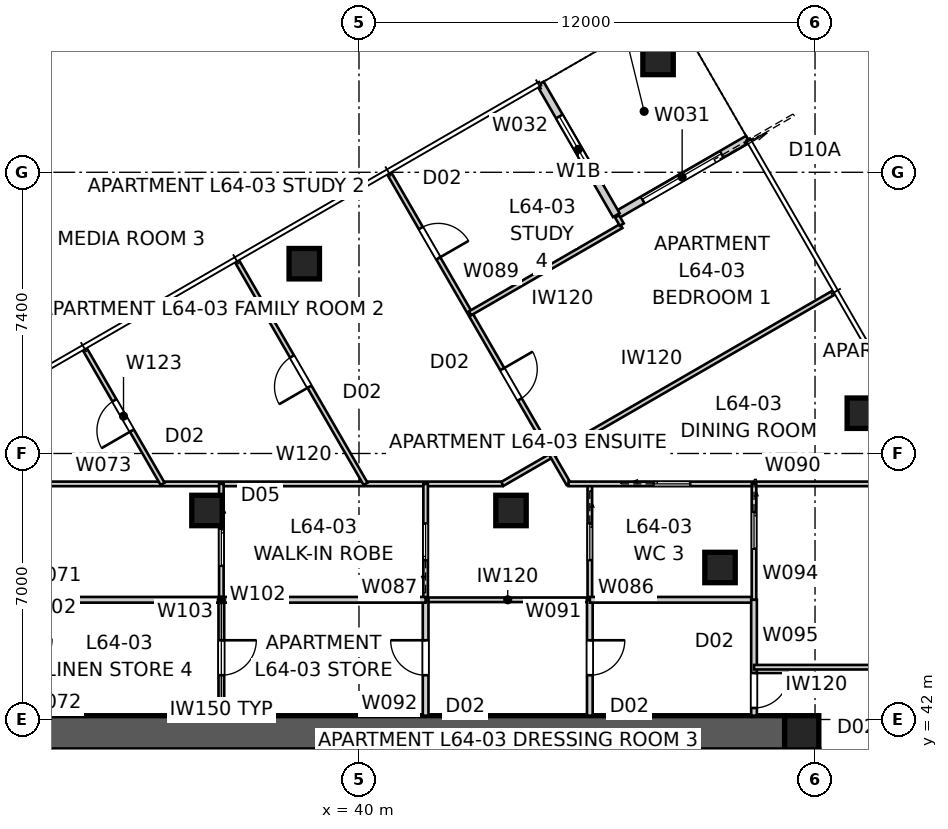
"""IFC4 building model, lengths in metres.
Left out: names, types, materials, properties, quantities, classifications, styles, units other than length and angle.
Written with IfcOpenShell. Run it as: python <this file> out.ifc"""

import sys

from ifc_helpers import new_model, si_unit, direction, frame, frame_2d, origin, origin_2d, place, context, subcontext, project, spatial, polyline, rectangle, outline, extrude, element, fill, save


model = new_model("IFC4")
c1 = context("Model", 3, precision=1e-05, world=origin(), true_north=direction((0.0, 1.0)))
c2 = subcontext(c1, "Body", "Model", "MODEL_VIEW")
j1 = project(units=[si_unit("LENGTHUNIT", "METRE"), si_unit("PLANEANGLEUNIT", "RADIAN")], contexts=[c1])
p1 = place(None, origin())
s1 = spatial("IfcSite", under=j1, at=p1, CompositionType="ELEMENT")
p2 = place(p1, origin())
s2 = spatial("IfcBuilding", under=s1, at=p2, CompositionType="ELEMENT")
p3 = place(p2, frame((0.0, 0.0, 232.0)))
s3 = spatial("IfcBuildingStorey", under=s2, at=p3, CompositionType="ELEMENT", Elevation=232.0)
p4 = place(p3, frame((28.8, 41.65, 0.0), z_axis=(0.0, 0.0, 1.0), x_axis=(1.0, 0.0, 0.0)))
e1 = element("IfcWall", 1, at=p4, inside=s3, PredefinedType="SHEAR", context=c2, shape_type="SweptSolid", body=[
    extrude(outline(polyline([(0.0, -0.45), (22.4, -0.45), (22.4, -0.025), (22.85, -0.025), (22.85, 0.025), (22.4, 0.025), (22.4, 0.45), (0.0, 0.45), (0.0, 0.025), (-0.45, 0.025), (-0.45, -0.025), (0.0, -0.025), (0.0, -0.45)])), origin(), (0.0, 0.0, 1.0), 3.4),
])
p5 = place(p3, frame((51.65, 18.8, 0.0), z_axis=(0.0, 0.0, 1.0), x_axis=(0.0, 1.0, 0.0)))
e2 = element("IfcWall", 2, at=p5, inside=s3, PredefinedType="SHEAR", context=c2, shape_type="SweptSolid", body=[
    extrude(outline(polyline([(0.0, -0.45), (22.4, -0.45), (22.4, -0.025), (22.85, -0.025), (22.85, 0.025), (22.4, 0.025), (22.4, 0.45), (0.0, 0.45), (0.0, 0.025), (-0.45, 0.025), (-0.45, -0.025), (0.0, -0.025), (0.0, -0.45)])), origin(), (0.0, 0.0, 1.0), 3.4),
])
p6 = place(p5, frame((11.14, 0.0, 0.0)))
e3 = element("IfcOpeningElement", 3, at=p6, cuts=e2, PredefinedType="OPENING", context=c2, shape_type="SweptSolid", body=[
    extrude(rectangle(XDim=1.02, YDim=2.4, at=frame_2d((0.51, 1.2))), frame((0.0, 0.46, 0.0), z_axis=(0.0, -1.0, 0.0), x_axis=(1.0, 0.0, 0.0)), (0.0, 0.0, 1.0), 0.92),
])
p7 = place(p3, frame((51.65, 41.65, 0.0), z_axis=(0.0, 0.0, 1.0), x_axis=(1.0, 0.0, 0.0)))
e4 = element("IfcColumn", 4, at=p7, inside=s3, PredefinedType="COLUMN", context=c2, shape_type="SweptSolid", body=[
    extrude(rectangle(XDim=0.9, YDim=0.9, at=origin_2d()), origin(), (0.0, 0.0, 1.0), 3.4),
])
for number, where, z_axis, x_axis in (
    (5, (53.245, 50.06, 0.0), (0.0, 0.0, 1.0), (1.0, 0.0, 0.0)),
    (6, (47.87, 59.37, 0.0), (0.0, 0.0, 1.0), (1.0, 0.0, 0.0)),
    (7, (38.56, 53.995, 0.0), (0.0, 0.0, 1.0), (1.0, 0.0, 0.0)),
):
    element("IfcColumn", number, at=place(p3, frame(where, z_axis=z_axis, x_axis=x_axis)), inside=s3, PredefinedType="COLUMN", context=c2, shape_type="SweptSolid", body=[
        extrude(rectangle(XDim=0.8, YDim=0.8, at=origin_2d()), origin(), (0.0, 0.0, 1.0), 3.2),
    ])
for number, where, z_axis, x_axis in (
    (8, (49.5, 46.0, 0.0), (0.0, 0.0, 1.0), (1.0, 0.0, 0.0)),
    (9, (44.0, 47.5, 0.0), (0.0, 0.0, 1.0), (1.0, 0.0, 0.0)),
    (10, (36.0, 47.5, 0.0), (0.0, 0.0, 1.0), (1.0, 0.0, 0.0)),
):
    element("IfcColumn", number, at=place(p3, frame(where, z_axis=z_axis, x_axis=x_axis)), inside=s3, PredefinedType="COLUMN", context=c2, shape_type="SweptSolid", body=[
        extrude(rectangle(XDim=0.8, YDim=0.8, at=origin_2d()), origin(), (0.0, 0.0, 1.0), 3.4),
    ])
p8 = place(p3, frame((50.236, 57.271, 0.0), z_axis=(0.0, 0.0, 1.0), x_axis=(-0.866026010844, -0.49999894854, 0.0)))
e11 = element("IfcWall", 11, at=p8, inside=s3, PredefinedType="SOLIDWALL", context=c2, shape_type="SweptSolid", body=[
    extrude(rectangle(XDim=4.0, YDim=0.2, at=frame_2d((2.0, 0.0))), origin(), (0.0, 0.0, 1.0), 3.2),
])
p9 = place(p8, frame((0.8, 0.0, 0.0)))
e12 = element("IfcOpeningElement", 12, at=p9, cuts=e11, PredefinedType="OPENING", context=c2, shape_type="SweptSolid", body=[
    extrude(rectangle(XDim=2.4, YDim=2.1, at=frame_2d((1.2, 1.05))), frame((0.0, 0.11, 0.0), z_axis=(0.0, -1.0, 0.0), x_axis=(1.0, 0.0, 0.0)), (0.0, 0.0, 1.0), 0.22),
])
p10 = place(p3, frame((46.771, 55.271, 0.0), z_axis=(0.0, 0.0, 1.0), x_axis=(-0.49999894854, 0.866026010844, 0.0)))
e13 = element("IfcWall", 13, at=p10, inside=s3, PredefinedType="SOLIDWALL", context=c2, shape_type="SweptSolid", body=[
    extrude(rectangle(XDim=4.0, YDim=0.2, at=frame_2d((2.0, 0.0))), origin(), (0.0, 0.0, 1.0), 3.2),
])
p11 = place(p10, frame((1.0, 0.0, 0.4)))
e14 = element("IfcOpeningElement", 14, at=p11, cuts=e13, PredefinedType="OPENING", context=c2, shape_type="SweptSolid", body=[
    extrude(rectangle(XDim=2.0, YDim=1.8, at=frame_2d((1.0, 0.9))), frame((0.0, 0.11, 0.0), z_axis=(0.0, -1.0, 0.0), x_axis=(1.0, 0.0, 0.0)), (0.0, 0.0, 1.0), 0.22),
])
p12 = place(p3, frame((59.486, 41.25, 0.0), z_axis=(0.0, 0.0, 1.0), x_axis=(-0.866020489494, -0.500008511703, 0.0)))
e15 = element("IfcWall", 15, at=p12, inside=s3, PredefinedType="PARTITIONING", context=c2, shape_type="SweptSolid", body=[
    extrude(rectangle(XDim=8.496, YDim=0.25, at=frame_2d((4.248, 0.0))), origin(), (0.0, 0.0, 1.0), 3.2),
])
p13 = place(p3, frame((26.603, 48.2, 0.0), z_axis=(0.0, 0.0, 1.0), x_axis=(1.0, 0.0, 0.0)))
e16 = element("IfcWall", 16, at=p13, inside=s3, PredefinedType="PARTITIONING", context=c2, shape_type="SweptSolid", body=[
    extrude(rectangle(XDim=17.17, YDim=0.12, at=frame_2d((8.585, 0.0))), origin(), (0.0, 0.0, 1.0), 3.2),
])
p14 = place(p13, frame((1.25, 0.0, 0.0)))
e17 = element("IfcOpeningElement", 17, at=p14, cuts=e16, PredefinedType="OPENING", context=c2, shape_type="SweptSolid", body=[
    extrude(rectangle(XDim=0.92, YDim=2.1, at=frame_2d((0.46, 1.05))), frame((0.0, 0.07, 0.0), z_axis=(0.0, -1.0, 0.0), x_axis=(1.0, 0.0, 0.0)), (0.0, 0.0, 1.0), 0.14),
])
p15 = place(p3, frame((46.074, 45.15, 0.0), z_axis=(0.0, 0.0, 1.0), x_axis=(-1.0, 0.0, 0.0)))
e18 = element("IfcWall", 18, at=p15, inside=s3, PredefinedType="PARTITIONING", context=c2, shape_type="SweptSolid", body=[
    extrude(rectangle(XDim=4.321, YDim=0.12, at=frame_2d((2.16, 0.0))), origin(), (0.0, 0.0, 1.0), 3.2),
])
p16 = place(p3, frame((46.074, 48.2, 0.0), z_axis=(0.0, 0.0, 1.0), x_axis=(0.0, -1.0, 0.0)))
e19 = element("IfcWall", 19, at=p16, inside=s3, PredefinedType="PARTITIONING", context=c2, shape_type="SweptSolid", body=[
    extrude(rectangle(XDim=3.05, YDim=0.12, at=frame_2d((1.525, 0.0))), origin(), (0.0, 0.0, 1.0), 3.2),
])
p17 = place(p16, frame((1.045, 0.0, 0.0)))
e20 = element("IfcOpeningElement", 20, at=p17, cuts=e19, PredefinedType="OPENING", context=c2, shape_type="SweptSolid", body=[
    extrude(rectangle(XDim=0.96, YDim=2.1, at=frame_2d((0.48, 1.05))), frame((0.0, 0.07, 0.0), z_axis=(0.0, -1.0, 0.0), x_axis=(1.0, 0.0, 0.0)), (0.0, 0.0, 1.0), 0.14),
])
p18 = place(p3, frame((41.753, 45.15, 0.0), z_axis=(0.0, 0.0, 1.0), x_axis=(0.0, 1.0, 0.0)))
e21 = element("IfcWall", 21, at=p18, inside=s3, PredefinedType="PARTITIONING", context=c2, shape_type="SweptSolid", body=[
    extrude(rectangle(XDim=3.05, YDim=0.12, at=frame_2d((1.525, 0.0))), origin(), (0.0, 0.0, 1.0), 3.2),
])
p19 = place(p18, frame((1.045, 0.0, 0.0)))
e22 = element("IfcOpeningElement", 22, at=p19, cuts=e21, PredefinedType="OPENING", context=c2, shape_type="SweptSolid", body=[
    extrude(rectangle(XDim=0.96, YDim=2.1, at=frame_2d((0.48, 1.05))), frame((0.0, 0.07, 0.0), z_axis=(0.0, -1.0, 0.0), x_axis=(1.0, 0.0, 0.0)), (0.0, 0.0, 1.0), 0.14),
])
p20 = place(p3, frame((43.773, 48.2, 0.0), z_axis=(0.0, 0.0, 1.0), x_axis=(0.866020818659, 0.500007941587, 0.0)))
e23 = element("IfcWall", 23, at=p20, inside=s3, PredefinedType="PARTITIONING", context=c2, shape_type="SweptSolid", body=[
    extrude(rectangle(XDim=10.092, YDim=0.12, at=frame_2d((5.046, 0.0))), origin(), (0.0, 0.0, 1.0), 3.2),
])
p21 = place(p3, frame((40.786, 56.388, 0.0), z_axis=(0.0, 0.0, 1.0), x_axis=(0.49999364752, -0.86602907136, 0.0)))
e24 = element("IfcWall", 24, at=p21, inside=s3, PredefinedType="PARTITIONING", context=c2, shape_type="SweptSolid", body=[
    extrude(rectangle(XDim=9.455, YDim=0.12, at=frame_2d((4.728, 0.0))), origin(), (0.0, 0.0, 1.0), 3.2),
])
p22 = place(p21, frame((1.681, 0.0, 0.0)))
e25 = element("IfcOpeningElement", 25, at=p22, cuts=e24, PredefinedType="OPENING", context=c2, shape_type="SweptSolid", body=[
    extrude(rectangle(XDim=0.92, YDim=2.34, at=frame_2d((0.46, 1.17))), frame((0.0, 0.07, 0.0), z_axis=(0.0, -1.0, 0.0), x_axis=(1.0, 0.0, 0.0)), (0.0, 0.0, 1.0), 0.14),
])
p23 = place(p21, frame((5.969, 0.0, 0.0)))
e26 = element("IfcOpeningElement", 26, at=p23, cuts=e24, PredefinedType="OPENING", context=c2, shape_type="SweptSolid", body=[
    extrude(rectangle(XDim=0.92, YDim=2.34, at=frame_2d((0.46, 1.17))), frame((0.0, 0.07, 0.0), z_axis=(0.0, -1.0, 0.0), x_axis=(1.0, 0.0, 0.0)), (0.0, 0.0, 1.0), 0.14),
])
p24 = place(p3, frame((45.514, 48.2, 0.0), z_axis=(0.0, 0.0, 1.0), x_axis=(1.0, 0.0, 0.0)))
e27 = element("IfcWall", 27, at=p24, inside=s3, PredefinedType="PARTITIONING", context=c2, shape_type="SweptSolid", body=[
    extrude(rectangle(XDim=9.913, YDim=0.12, at=frame_2d((4.957, 0.0))), origin(), (0.0, 0.0, 1.0), 3.2),
])
p25 = place(p24, frame((2.241, 0.0, 0.0)))
e28 = element("IfcOpeningElement", 28, at=p25, cuts=e27, PredefinedType="OPENING", context=c2, shape_type="SweptSolid", body=[
    extrude(rectangle(XDim=0.96, YDim=2.1, at=frame_2d((0.48, 1.05))), frame((0.0, 0.07, 0.0), z_axis=(0.0, -1.0, 0.0), x_axis=(1.0, 0.0, 0.0)), (0.0, 0.0, 1.0), 0.14),
])
p26 = place(p24, frame((8.603, 0.0, 0.0)))
e29 = element("IfcOpeningElement", 29, at=p26, cuts=e27, PredefinedType="OPENING", context=c2, shape_type="SweptSolid", body=[
    extrude(rectangle(XDim=0.92, YDim=2.1, at=frame_2d((0.46, 1.05))), frame((0.0, 0.07, 0.0), z_axis=(0.0, -1.0, 0.0), x_axis=(1.0, 0.0, 0.0)), (0.0, 0.0, 1.0), 0.14),
])
p27 = place(p3, frame((46.074, 45.15, 0.0), z_axis=(0.0, 0.0, 1.0), x_axis=(0.0, -1.0, 0.0)))
e30 = element("IfcWall", 30, at=p27, inside=s3, PredefinedType="SOLIDWALL", context=c2, shape_type="SweptSolid", body=[
    extrude(rectangle(XDim=3.05, YDim=0.15, at=frame_2d((1.525, 0.0))), origin(), (0.0, 0.0, 1.0), 3.2),
])
p28 = place(p27, frame((1.065, 0.0, 0.0)))
e31 = element("IfcOpeningElement", 31, at=p28, cuts=e30, PredefinedType="OPENING", context=c2, shape_type="SweptSolid", body=[
    extrude(rectangle(XDim=0.92, YDim=2.34, at=frame_2d((0.46, 1.17))), frame((0.0, 0.085, 0.0), z_axis=(0.0, -1.0, 0.0), x_axis=(1.0, 0.0, 0.0)), (0.0, 0.0, 1.0), 0.17),
])
p29 = place(p3, frame((41.753, 42.1, 0.0), z_axis=(0.0, 0.0, 1.0), x_axis=(0.0, 1.0, 0.0)))
e32 = element("IfcWall", 32, at=p29, inside=s3, PredefinedType="SOLIDWALL", context=c2, shape_type="SweptSolid", body=[
    extrude(rectangle(XDim=3.05, YDim=0.15, at=frame_2d((1.525, 0.0))), origin(), (0.0, 0.0, 1.0), 3.2),
])
p30 = place(p29, frame((1.065, 0.0, 0.0)))
e33 = element("IfcOpeningElement", 33, at=p30, cuts=e32, PredefinedType="OPENING", context=c2, shape_type="SweptSolid", body=[
    extrude(rectangle(XDim=0.92, YDim=2.34, at=frame_2d((0.46, 1.17))), frame((0.0, 0.085, 0.0), z_axis=(0.0, -1.0, 0.0), x_axis=(1.0, 0.0, 0.0)), (0.0, 0.0, 1.0), 0.17),
])
p31 = place(p3, frame((50.395, 45.15, 0.0), z_axis=(0.0, 0.0, 1.0), x_axis=(-1.0, 0.0, 0.0)))
e34 = element("IfcWall", 34, at=p31, inside=s3, PredefinedType="SOLIDWALL", context=c2, shape_type="SweptSolid", body=[
    extrude(rectangle(XDim=4.321, YDim=0.15, at=frame_2d((2.16, 0.0))), origin(), (0.0, 0.0, 1.0), 3.2),
])
p32 = place(p3, frame((50.395, 48.2, 0.0), z_axis=(0.0, 0.0, 1.0), x_axis=(0.0, -1.0, 0.0)))
e35 = element("IfcWall", 35, at=p32, inside=s3, PredefinedType="PARTITIONING", context=c2, shape_type="SweptSolid", body=[
    extrude(rectangle(XDim=3.05, YDim=0.12, at=frame_2d((1.525, 0.0))), origin(), (0.0, 0.0, 1.0), 3.2),
])
p33 = place(p32, frame((0.745, 0.0, 0.0)))
e36 = element("IfcOpeningElement", 36, at=p33, cuts=e35, PredefinedType="OPENING", context=c2, shape_type="SweptSolid", body=[
    extrude(rectangle(XDim=0.96, YDim=2.1, at=frame_2d((0.48, 1.05))), frame((0.0, 0.07, 0.0), z_axis=(0.0, -1.0, 0.0), x_axis=(1.0, 0.0, 0.0)), (0.0, 0.0, 1.0), 0.14),
])
p34 = place(p3, frame((50.395, 45.15, 0.0), z_axis=(0.0, 0.0, 1.0), x_axis=(0.0, -1.0, 0.0)))
e37 = element("IfcWall", 37, at=p34, inside=s3, PredefinedType="SOLIDWALL", context=c2, shape_type="SweptSolid", body=[
    extrude(rectangle(XDim=3.05, YDim=0.15, at=frame_2d((1.525, 0.0))), origin(), (0.0, 0.0, 1.0), 3.2),
])
p35 = place(p34, frame((1.927, 0.0, 0.0)))
e38 = element("IfcOpeningElement", 38, at=p35, cuts=e37, PredefinedType="OPENING", context=c2, shape_type="SweptSolid", body=[
    extrude(rectangle(XDim=0.92, YDim=2.34, at=frame_2d((0.46, 1.17))), frame((0.0, 0.085, 0.0), z_axis=(0.0, -1.0, 0.0), x_axis=(1.0, 0.0, 0.0)), (0.0, 0.0, 1.0), 0.17),
])
p36 = place(p3, frame((53.68, 43.376, 0.0), z_axis=(0.0, 0.0, 1.0), x_axis=(-1.0, 0.0, 0.0)))
e39 = element("IfcWall", 39, at=p36, inside=s3, PredefinedType="PARTITIONING", context=c2, shape_type="SweptSolid", body=[
    extrude(rectangle(XDim=3.285, YDim=0.12, at=frame_2d((1.643, 0.0))), origin(), (0.0, 0.0, 1.0), 3.2),
])
p37 = place(p3, frame((41.753, 45.15, 0.0), z_axis=(0.0, 0.0, 1.0), x_axis=(-1.0, 0.0, 0.0)))
e40 = element("IfcWall", 40, at=p37, inside=s3, PredefinedType="SOLIDWALL", context=c2, shape_type="SweptSolid", body=[
    extrude(rectangle(XDim=10.751, YDim=0.15, at=frame_2d((5.375, 0.0))), origin(), (0.0, 0.0, 1.0), 3.2),
])
p38 = place(p3, frame((36.378, 48.2, 0.0), z_axis=(0.0, 0.0, 1.0), x_axis=(0.0, -1.0, 0.0)))
e41 = element("IfcWall", 41, at=p38, inside=s3, PredefinedType="PARTITIONING", context=c2, shape_type="SweptSolid", body=[
    extrude(rectangle(XDim=3.05, YDim=0.12, at=frame_2d((1.525, 0.0))), origin(), (0.0, 0.0, 1.0), 3.2),
])
p39 = place(p38, frame((1.195, 0.0, 0.0)))
e42 = element("IfcOpeningElement", 42, at=p39, cuts=e41, PredefinedType="OPENING", context=c2, shape_type="SweptSolid", body=[
    extrude(rectangle(XDim=0.96, YDim=2.1, at=frame_2d((0.48, 1.05))), frame((0.0, 0.07, 0.0), z_axis=(0.0, -1.0, 0.0), x_axis=(1.0, 0.0, 0.0)), (0.0, 0.0, 1.0), 0.14),
])
p40 = place(p3, frame((36.378, 45.15, 0.0), z_axis=(0.0, 0.0, 1.0), x_axis=(0.0, -1.0, 0.0)))
e43 = element("IfcWall", 43, at=p40, inside=s3, PredefinedType="SOLIDWALL", context=c2, shape_type="SweptSolid", body=[
    extrude(rectangle(XDim=3.05, YDim=0.15, at=frame_2d((1.525, 0.0))), origin(), (0.0, 0.0, 1.0), 3.2),
])
p41 = place(p40, frame((1.065, 0.0, 0.0)))
e44 = element("IfcOpeningElement", 44, at=p41, cuts=e43, PredefinedType="OPENING", context=c2, shape_type="SweptSolid", body=[
    extrude(rectangle(XDim=0.92, YDim=2.34, at=frame_2d((0.46, 1.17))), frame((0.0, 0.085, 0.0), z_axis=(0.0, -1.0, 0.0), x_axis=(1.0, 0.0, 0.0)), (0.0, 0.0, 1.0), 0.17),
])
p42 = place(p3, frame((42.922, 52.688, 0.0), z_axis=(0.0, 0.0, 1.0), x_axis=(0.866034300541, 0.499984590049, 0.0)))
e45 = element("IfcWall", 45, at=p42, inside=s3, PredefinedType="PARTITIONING", context=c2, shape_type="SweptSolid", body=[
    extrude(rectangle(XDim=4.595, YDim=0.12, at=frame_2d((2.298, 0.0))), origin(), (0.0, 0.0, 1.0), 3.2),
])
p43 = place(p3, frame((46.914, 55.024, 0.0), z_axis=(0.0, 0.0, 1.0), x_axis=(-0.499349249257, 0.86640078905, 0.0)))
e46 = element("IfcWall", 46, at=p43, inside=s3, PredefinedType="PARTITIONING", context=c2, shape_type="SweptSolid", body=[
    extrude(rectangle(XDim=0.245, YDim=0.12, at=frame_2d((0.123, 0.0))), origin(), (0.0, 0.0, 1.0), 3.2),
])
p44 = place(p3, frame((40.173, 48.2, 0.0), z_axis=(0.0, 0.0, 1.0), x_axis=(-0.500009005995, 0.866020204108, 0.0)))
e47 = element("IfcWall", 47, at=p44, inside=s3, PredefinedType="PARTITIONING", context=c2, shape_type="SweptSolid", body=[
    extrude(rectangle(XDim=6.785, YDim=0.12, at=frame_2d((3.393, 0.0))), origin(), (0.0, 0.0, 1.0), 3.2),
])
p45 = place(p44, frame((2.952, 0.0, 0.0)))
e48 = element("IfcOpeningElement", 48, at=p45, cuts=e47, PredefinedType="OPENING", context=c2, shape_type="SweptSolid", body=[
    extrude(rectangle(XDim=0.92, YDim=2.34, at=frame_2d((0.46, 1.17))), frame((0.0, 0.07, 0.0), z_axis=(0.0, -1.0, 0.0), x_axis=(1.0, 0.0, 0.0)), (0.0, 0.0, 1.0), 0.14),
])
p46 = place(p3, frame((34.833, 48.2, 0.0), z_axis=(0.0, 0.0, 1.0), x_axis=(-0.499999798456, 0.866025520146, 0.0)))
e49 = element("IfcWall", 49, at=p46, inside=s3, PredefinedType="PARTITIONING", context=c2, shape_type="SweptSolid", body=[
    extrude(rectangle(XDim=4.115, YDim=0.12, at=frame_2d((2.057, 0.0))), origin(), (0.0, 0.0, 1.0), 3.2),
])
p47 = place(p46, frame((1.617, 0.0, 0.0)))
e50 = element("IfcOpeningElement", 50, at=p47, cuts=e49, PredefinedType="OPENING", context=c2, shape_type="SweptSolid", body=[
    extrude(rectangle(XDim=0.92, YDim=2.34, at=frame_2d((0.46, 1.17))), frame((0.0, 0.07, 0.0), z_axis=(0.0, -1.0, 0.0), x_axis=(1.0, 0.0, 0.0)), (0.0, 0.0, 1.0), 0.14),
])
p48 = place(p9, origin())
e51 = element("IfcDoor", 51, at=p48, inside=s3, OperationType="SLIDING_TO_LEFT", PredefinedType="DOOR", context=c2, shape_type="SweptSolid", body=[
    extrude(rectangle(XDim=2.4, YDim=2.1, at=frame_2d((1.2, 1.05))), frame((0.0, 0.025, 0.0), z_axis=(0.0, -1.0, 0.0), x_axis=(1.0, 0.0, 0.0)), (0.0, 0.0, 1.0), 0.05),
])
fill(e12, e51)
p49 = place(p11, origin())
e52 = element("IfcWindow", 52, at=p49, inside=s3, PartitioningType="SINGLE_PANEL", PredefinedType="WINDOW", context=c2, shape_type="SweptSolid", body=[
    extrude(rectangle(XDim=2.0, YDim=1.8, at=frame_2d((1.0, 0.9))), frame((0.0, 0.03, 0.0), z_axis=(0.0, -1.0, 0.0), x_axis=(1.0, 0.0, 0.0)), (0.0, 0.0, 1.0), 0.06),
])
fill(e14, e52)
p50 = place(p47, origin())
e53 = element("IfcDoor", 53, at=p50, inside=s3, OperationType="SINGLE_SWING_LEFT", PredefinedType="DOOR", context=c2, shape_type="SweptSolid", body=[
    extrude(rectangle(XDim=0.92, YDim=2.34, at=frame_2d((0.46, 1.17))), frame((0.0, 0.025, 0.0), z_axis=(0.0, -1.0, 0.0), x_axis=(1.0, 0.0, 0.0)), (0.0, 0.0, 1.0), 0.05),
])
fill(e50, e53)
p51 = place(p39, origin())
e54 = element("IfcDoor", 54, at=p51, inside=s3, OperationType="SLIDING_TO_LEFT", PredefinedType="DOOR", context=c2, shape_type="SweptSolid", body=[
    extrude(rectangle(XDim=0.96, YDim=2.1, at=frame_2d((0.48, 1.05))), frame((0.0, 0.025, 0.0), z_axis=(0.0, -1.0, 0.0), x_axis=(1.0, 0.0, 0.0)), (0.0, 0.0, 1.0), 0.05),
])
fill(e42, e54)
p52 = place(p41, origin())
e55 = element("IfcDoor", 55, at=p52, inside=s3, OperationType="SINGLE_SWING_LEFT", PredefinedType="DOOR", context=c2, shape_type="SweptSolid", body=[
    extrude(rectangle(XDim=0.92, YDim=2.34, at=frame_2d((0.46, 1.17))), frame((0.0, 0.025, 0.0), z_axis=(0.0, -1.0, 0.0), x_axis=(1.0, 0.0, 0.0)), (0.0, 0.0, 1.0), 0.05),
])
fill(e44, e55)
p53 = place(p45, origin())
e56 = element("IfcDoor", 56, at=p53, inside=s3, OperationType="SINGLE_SWING_LEFT", PredefinedType="DOOR", context=c2, shape_type="SweptSolid", body=[
    extrude(rectangle(XDim=0.92, YDim=2.34, at=frame_2d((0.46, 1.17))), frame((0.0, 0.025, 0.0), z_axis=(0.0, -1.0, 0.0), x_axis=(1.0, 0.0, 0.0)), (0.0, 0.0, 1.0), 0.05),
])
fill(e48, e56)
p54 = place(p19, origin())
e57 = element("IfcDoor", 57, at=p54, inside=s3, OperationType="SLIDING_TO_LEFT", PredefinedType="DOOR", context=c2, shape_type="SweptSolid", body=[
    extrude(rectangle(XDim=0.96, YDim=2.1, at=frame_2d((0.48, 1.05))), frame((0.0, 0.025, 0.0), z_axis=(0.0, -1.0, 0.0), x_axis=(1.0, 0.0, 0.0)), (0.0, 0.0, 1.0), 0.05),
])
fill(e22, e57)
p55 = place(p30, origin())
e58 = element("IfcDoor", 58, at=p55, inside=s3, OperationType="SINGLE_SWING_RIGHT", PredefinedType="DOOR", context=c2, shape_type="SweptSolid", body=[
    extrude(rectangle(XDim=0.92, YDim=2.34, at=frame_2d((0.46, 1.17))), frame((0.0, 0.025, 0.0), z_axis=(0.0, -1.0, 0.0), x_axis=(1.0, 0.0, 0.0)), (0.0, 0.0, 1.0), 0.05),
])
fill(e33, e58)
p56 = place(p22, origin())
e59 = element("IfcDoor", 59, at=p56, inside=s3, OperationType="SINGLE_SWING_RIGHT", PredefinedType="DOOR", context=c2, shape_type="SweptSolid", body=[
    extrude(rectangle(XDim=0.92, YDim=2.34, at=frame_2d((0.46, 1.17))), frame((0.0, 0.025, 0.0), z_axis=(0.0, -1.0, 0.0), x_axis=(1.0, 0.0, 0.0)), (0.0, 0.0, 1.0), 0.05),
])
fill(e25, e59)
p57 = place(p23, origin())
e60 = element("IfcDoor", 60, at=p57, inside=s3, OperationType="SINGLE_SWING_LEFT", PredefinedType="DOOR", context=c2, shape_type="SweptSolid", body=[
    extrude(rectangle(XDim=0.92, YDim=2.34, at=frame_2d((0.46, 1.17))), frame((0.0, 0.025, 0.0), z_axis=(0.0, -1.0, 0.0), x_axis=(1.0, 0.0, 0.0)), (0.0, 0.0, 1.0), 0.05),
])
fill(e26, e60)
p58 = place(p17, origin())
e61 = element("IfcDoor", 61, at=p58, inside=s3, OperationType="SLIDING_TO_LEFT", PredefinedType="DOOR", context=c2, shape_type="SweptSolid", body=[
    extrude(rectangle(XDim=0.96, YDim=2.1, at=frame_2d((0.48, 1.05))), frame((0.0, 0.025, 0.0), z_axis=(0.0, -1.0, 0.0), x_axis=(1.0, 0.0, 0.0)), (0.0, 0.0, 1.0), 0.05),
])
fill(e20, e61)
p59 = place(p28, origin())
e62 = element("IfcDoor", 62, at=p59, inside=s3, OperationType="SINGLE_SWING_LEFT", PredefinedType="DOOR", context=c2, shape_type="SweptSolid", body=[
    extrude(rectangle(XDim=0.92, YDim=2.34, at=frame_2d((0.46, 1.17))), frame((0.0, 0.025, 0.0), z_axis=(0.0, -1.0, 0.0), x_axis=(1.0, 0.0, 0.0)), (0.0, 0.0, 1.0), 0.05),
])
fill(e31, e62)
p60 = place(p25, origin())
e63 = element("IfcDoor", 63, at=p60, inside=s3, OperationType="SLIDING_TO_LEFT", PredefinedType="DOOR", context=c2, shape_type="SweptSolid", body=[
    extrude(rectangle(XDim=0.96, YDim=2.1, at=frame_2d((0.48, 1.05))), frame((0.0, 0.025, 0.0), z_axis=(0.0, -1.0, 0.0), x_axis=(1.0, 0.0, 0.0)), (0.0, 0.0, 1.0), 0.05),
])
fill(e28, e63)
p61 = place(p33, origin())
e64 = element("IfcDoor", 64, at=p61, inside=s3, OperationType="SLIDING_TO_LEFT", PredefinedType="DOOR", context=c2, shape_type="SweptSolid", body=[
    extrude(rectangle(XDim=0.96, YDim=2.1, at=frame_2d((0.48, 1.05))), frame((0.0, 0.025, 0.0), z_axis=(0.0, -1.0, 0.0), x_axis=(1.0, 0.0, 0.0)), (0.0, 0.0, 1.0), 0.05),
])
fill(e36, e64)
p62 = place(p35, origin())
e65 = element("IfcDoor", 65, at=p62, inside=s3, OperationType="SINGLE_SWING_LEFT", PredefinedType="DOOR", context=c2, shape_type="SweptSolid", body=[
    extrude(rectangle(XDim=0.92, YDim=2.34, at=frame_2d((0.46, 1.17))), frame((0.0, 0.025, 0.0), z_axis=(0.0, -1.0, 0.0), x_axis=(1.0, 0.0, 0.0)), (0.0, 0.0, 1.0), 0.05),
])
fill(e38, e65)
save(model, sys.argv[1])
